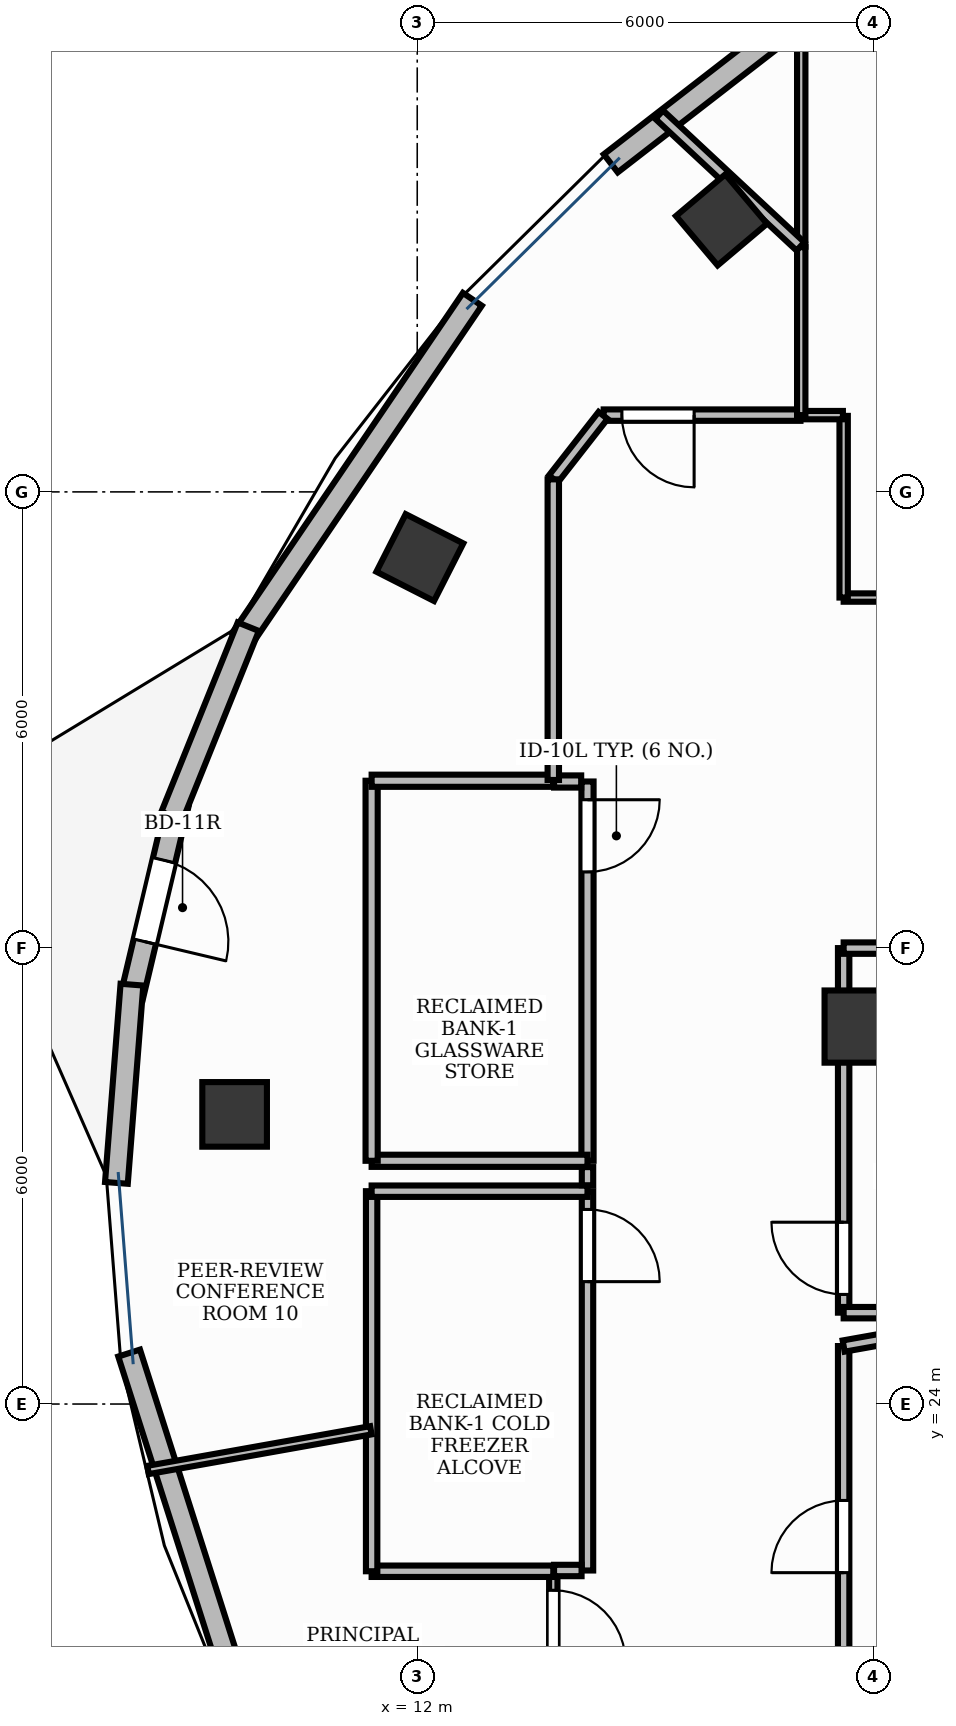
"""IFC4 building model, lengths in metres.
Left out: names, types, materials, properties, quantities, classifications, styles, units other than length and angle.
Written with IfcOpenShell. Run it as: python <this file> out.ifc"""

import sys

from ifc_helpers import new_model, si_unit, direction, frame, frame_2d, origin, origin_2d, place, context, subcontext, project, spatial, rectangle, extrude, element, fill, save


model = new_model("IFC4")
c1 = context("Model", 3, precision=1e-05, world=origin(), true_north=direction((0.0, 1.0)))
c2 = subcontext(c1, "Body", "Model", "MODEL_VIEW")
j1 = project(units=[si_unit("LENGTHUNIT", "METRE"), si_unit("PLANEANGLEUNIT", "RADIAN")], contexts=[c1])
p1 = place(None, origin())
s1 = spatial("IfcSite", under=j1, at=p1, CompositionType="ELEMENT")
p2 = place(p1, origin())
s2 = spatial("IfcBuilding", under=s1, at=p2, CompositionType="ELEMENT")
p3 = place(p2, frame((0.0, 0.0, 264.6)))
s3 = spatial("IfcBuildingStorey", under=s2, at=p3, CompositionType="ELEMENT", Elevation=264.6)
for number, where, z_axis, x_axis in (
    (1, (16.003, 39.579, -0.0), (0.0, 0.0, 1.0), (0.764, 0.645, 0.0)),
    (2, (12.034, 35.136, -0.0), (0.0, 0.0, 1.0), (0.453, 0.891, 0.0)),
    (3, (9.597, 27.81, -0.0), (0.0, 0.0, 1.0), (0.0, 1.0, 0.0)),
):
    element("IfcColumn", number, at=place(p3, frame(where, z_axis=z_axis, x_axis=x_axis)), inside=s3, PredefinedType="COLUMN", context=c2, shape_type="SweptSolid", body=[
        extrude(rectangle(XDim=0.85, YDim=0.85, at=origin_2d()), origin(), (0.0, 0.0, 1.0), 3.901),
    ])
p4 = place(p3, frame((17.834, 28.966, -0.0), z_axis=(0.0, 0.0, 1.0), x_axis=(1.0, 0.0, 0.0)))
e4 = element("IfcColumn", 4, at=p4, inside=s3, PredefinedType="COLUMN", context=c2, shape_type="SweptSolid", body=[
    extrude(rectangle(XDim=0.95, YDim=0.95, at=origin_2d()), origin(), (0.0, 0.0, 1.0), 3.901),
])
p5 = place(p3, frame((8.843, 31.883, 0.0), z_axis=(0.0, 0.0, 1.0), x_axis=(-0.230698003521, -0.973025401093, 0.0)))
e5 = element("IfcWall", 5, at=p5, inside=s3, PredefinedType="STANDARD", context=c2, shape_type="SweptSolid", body=[
    extrude(rectangle(XDim=2.6, YDim=0.3, at=frame_2d((1.3, 0.0))), origin(), (0.0, 0.0, 1.0), 3.9),
])
p6 = place(p5, frame((0.75, 0.0, 0.0)))
e6 = element("IfcOpeningElement", 6, at=p6, cuts=e5, PredefinedType="OPENING", context=c2, shape_type="SweptSolid", body=[
    extrude(rectangle(XDim=1.1, YDim=2.15, at=frame_2d((0.55, 1.075))), frame((0.0, 0.165, 0.0), z_axis=(0.0, -1.0, 0.0), x_axis=(1.0, 0.0, 0.0)), (0.0, 0.0, 1.0), 0.33),
])
p7 = place(p3, frame((16.92, 42.162, 0.0), z_axis=(0.0, 0.0, 1.0), x_axis=(-0.790506568463, -0.612453561682, 0.0)))
e7 = element("IfcWall", 7, at=p7, inside=s3, PredefinedType="STANDARD", context=c2, shape_type="SweptSolid", body=[
    extrude(rectangle(XDim=3.003, YDim=0.3, at=frame_2d((1.501, 0.0))), origin(), (0.0, 0.0, 1.0), 3.9),
])
p8 = place(p3, frame((12.725, 38.534, 0.0), z_axis=(0.0, 0.0, 1.0), x_axis=(-0.561547791281, -0.827444305139, 0.0)))
e8 = element("IfcWall", 8, at=p8, inside=s3, PredefinedType="STANDARD", context=c2, shape_type="SweptSolid", body=[
    extrude(rectangle(XDim=5.407, YDim=0.3, at=frame_2d((2.704, 0.0))), origin(), (0.0, 0.0, 1.0), 3.47),
])
p9 = place(p3, frame((9.778, 34.227, 0.0), z_axis=(0.0, 0.0, 1.0), x_axis=(-0.373974639596, -0.927438930032, 0.0)))
e9 = element("IfcWall", 9, at=p9, inside=s3, PredefinedType="STANDARD", context=c2, shape_type="SweptSolid", body=[
    extrude(rectangle(XDim=2.686, YDim=0.3, at=frame_2d((1.343, 0.0))), origin(), (0.0, 0.0, 1.0), 3.9),
])
p10 = place(p3, frame((8.247, 29.517, 0.0), z_axis=(0.0, 0.0, 1.0), x_axis=(-0.078109406708, -0.996944793147, 0.0)))
e10 = element("IfcWall", 10, at=p10, inside=s3, PredefinedType="STANDARD", context=c2, shape_type="SweptSolid", body=[
    extrude(rectangle(XDim=2.616, YDim=0.3, at=frame_2d((1.308, 0.0))), origin(), (0.0, 0.0, 1.0), 3.9),
])
p11 = place(p3, frame((8.21, 24.67, 0.0), z_axis=(0.0, 0.0, 1.0), x_axis=(0.303876387353, -0.952711467974, 0.0)))
e11 = element("IfcWall", 11, at=p11, inside=s3, PredefinedType="STANDARD", context=c2, shape_type="SweptSolid", body=[
    extrude(rectangle(XDim=5.152, YDim=0.3, at=frame_2d((2.576, 0.0))), origin(), (0.0, 0.0, 1.0), 3.9),
])
p12 = place(p3, frame((14.24, 26.8, 0.0), z_axis=(0.0, 0.0, 1.0), x_axis=(0.0, -1.0, 0.0)))
e12 = element("IfcWall", 12, at=p12, inside=s3, PredefinedType="PARTITIONING", context=c2, shape_type="SweptSolid", body=[
    extrude(rectangle(XDim=4.99, YDim=0.15, at=frame_2d((2.495, 0.0))), origin(), (0.0, 0.0, 1.0), 2.91),
])
p13 = place(p12, frame((0.24, 0.0, 0.0)))
e13 = element("IfcOpeningElement", 13, at=p13, cuts=e12, PredefinedType="OPENING", context=c2, shape_type="SweptSolid", body=[
    extrude(rectangle(XDim=0.95, YDim=2.15, at=frame_2d((0.475, 1.075))), frame((0.0, 0.09, 0.0), z_axis=(0.0, -1.0, 0.0), x_axis=(1.0, 0.0, 0.0)), (0.0, 0.0, 1.0), 0.18),
])
p14 = place(p3, frame((14.24, 32.19, 0.0), z_axis=(0.0, 0.0, 1.0), x_axis=(0.0, -1.0, 0.0)))
e14 = element("IfcWall", 14, at=p14, inside=s3, PredefinedType="PARTITIONING", context=c2, shape_type="SweptSolid", body=[
    extrude(rectangle(XDim=4.99, YDim=0.16, at=frame_2d((2.495, 0.0))), origin(), (0.0, 0.0, 1.0), 2.91),
])
p15 = place(p14, frame((0.24, 0.0, 0.0)))
e15 = element("IfcOpeningElement", 15, at=p15, cuts=e14, PredefinedType="OPENING", context=c2, shape_type="SweptSolid", body=[
    extrude(rectangle(XDim=0.95, YDim=2.15, at=frame_2d((0.475, 1.075))), frame((0.0, 0.095, 0.0), z_axis=(0.0, -1.0, 0.0), x_axis=(1.0, 0.0, 0.0)), (0.0, 0.0, 1.0), 0.19),
])
p16 = place(p3, frame((13.79, 21.79, 0.0), z_axis=(0.0, 0.0, 1.0), x_axis=(0.0, -1.0, 0.0)))
e16 = element("IfcWall", 16, at=p16, inside=s3, PredefinedType="MOVABLE", context=c2, shape_type="SweptSolid", body=[
    extrude(rectangle(XDim=3.955, YDim=0.11, at=frame_2d((1.978, 0.0))), origin(), (0.0, 0.0, 1.0), 2.91),
])
p17 = place(p16, frame((0.24, 0.0, 0.0)))
e17 = element("IfcOpeningElement", 17, at=p17, cuts=e16, PredefinedType="OPENING", context=c2, shape_type="SweptSolid", body=[
    extrude(rectangle(XDim=0.95, YDim=2.15, at=frame_2d((0.475, 1.075))), frame((0.0, 0.07, 0.0), z_axis=(0.0, -1.0, 0.0), x_axis=(1.0, 0.0, 0.0)), (0.0, 0.0, 1.0), 0.14),
])
p18 = place(p3, frame((17.61, 16.41, 0.0), z_axis=(0.0, 0.0, 1.0), x_axis=(0.0, 1.0, 0.0)))
e18 = element("IfcWall", 18, at=p18, inside=s3, PredefinedType="PARTITIONING", context=c2, shape_type="SweptSolid", body=[
    extrude(rectangle(XDim=8.353, YDim=0.15, at=frame_2d((4.176, 0.0))), origin(), (0.0, 0.0, 1.0), 2.91),
])
p19 = place(p18, frame((5.371, 0.0, 0.0)))
e19 = element("IfcOpeningElement", 19, at=p19, cuts=e18, PredefinedType="OPENING", context=c2, shape_type="SweptSolid", body=[
    extrude(rectangle(XDim=0.95, YDim=2.15, at=frame_2d((0.475, 1.075))), frame((0.0, 0.09, 0.0), z_axis=(0.0, -1.0, 0.0), x_axis=(1.0, 0.0, 0.0)), (0.0, 0.0, 1.0), 0.18),
])
p20 = place(p3, frame((17.042, 37.01, 0.0), z_axis=(0.0, 0.0, 1.0), x_axis=(-1.0, 0.0, 0.0)))
e20 = element("IfcWall", 20, at=p20, inside=s3, PredefinedType="PARTITIONING", context=c2, shape_type="SweptSolid", body=[
    extrude(rectangle(XDim=2.589, YDim=0.15, at=frame_2d((1.295, 0.0))), origin(), (0.0, 0.0, 1.0), 2.91),
])
p21 = place(p20, frame((1.399, 0.0, 0.0)))
e21 = element("IfcOpeningElement", 21, at=p21, cuts=e20, PredefinedType="OPENING", context=c2, shape_type="SweptSolid", body=[
    extrude(rectangle(XDim=0.95, YDim=2.15, at=frame_2d((0.475, 1.075))), frame((0.0, 0.09, 0.0), z_axis=(0.0, -1.0, 0.0), x_axis=(1.0, 0.0, 0.0)), (0.0, 0.0, 1.0), 0.18),
])
p22 = place(p3, frame((17.61, 25.202, 0.0), z_axis=(0.0, 0.0, 1.0), x_axis=(0.0, 1.0, 0.0)))
e22 = element("IfcWall", 22, at=p22, inside=s3, PredefinedType="PARTITIONING", context=c2, shape_type="SweptSolid", body=[
    extrude(rectangle(XDim=4.796, YDim=0.15, at=frame_2d((2.398, 0.0))), origin(), (0.0, 0.0, 1.0), 2.91),
])
p23 = place(p22, frame((0.24, 0.0, 0.0)))
e23 = element("IfcOpeningElement", 23, at=p23, cuts=e22, PredefinedType="OPENING", context=c2, shape_type="SweptSolid", body=[
    extrude(rectangle(XDim=0.95, YDim=2.15, at=frame_2d((0.475, 1.075))), frame((0.0, 0.09, 0.0), z_axis=(0.0, -1.0, 0.0), x_axis=(1.0, 0.0, 0.0)), (0.0, 0.0, 1.0), 0.18),
])
p24 = place(p3, frame((14.162, 21.81, 0.0), z_axis=(0.0, 0.0, 1.0), x_axis=(-1.0, 0.0, 0.0)))
e24 = element("IfcWall", 24, at=p24, inside=s3, PredefinedType="PARTITIONING", context=c2, shape_type="SweptSolid", body=[
    extrude(rectangle(XDim=0.362, YDim=0.15, at=frame_2d((0.181, 0.0))), origin(), (0.0, 0.0, 1.0), 2.91),
])
p25 = place(p3, frame((13.79, 21.8, 0.0), z_axis=(0.0, 0.0, 1.0), x_axis=(-1.0, 0.0, 0.0)))
e25 = element("IfcWall", 25, at=p25, inside=s3, PredefinedType="PARTITIONING", context=c2, shape_type="SweptSolid", body=[
    extrude(rectangle(XDim=2.39, YDim=0.15, at=frame_2d((1.195, 0.0))), origin(), (0.0, 0.0, 1.0), 2.91),
])
p26 = place(p3, frame((11.4, 21.8, 0.0), z_axis=(0.0, 0.0, 1.0), x_axis=(0.0, 1.0, 0.0)))
e26 = element("IfcWall", 26, at=p26, inside=s3, PredefinedType="PARTITIONING", context=c2, shape_type="SweptSolid", body=[
    extrude(rectangle(XDim=5.0, YDim=0.15, at=frame_2d((2.5, 0.0))), origin(), (0.0, 0.0, 1.0), 2.91),
])
p27 = place(p3, frame((11.4, 26.8, 0.0), z_axis=(0.0, 0.0, 1.0), x_axis=(1.0, 0.0, 0.0)))
e27 = element("IfcWall", 27, at=p27, inside=s3, PredefinedType="PARTITIONING", context=c2, shape_type="SweptSolid", body=[
    extrude(rectangle(XDim=2.84, YDim=0.15, at=frame_2d((1.42, 0.0))), origin(), (0.0, 0.0, 1.0), 2.91),
])
p28 = place(p3, frame((13.8, 32.19, 0.0), z_axis=(0.0, 0.0, 1.0), x_axis=(1.0, 0.0, 0.0)))
e28 = element("IfcWall", 28, at=p28, inside=s3, PredefinedType="PARTITIONING", context=c2, shape_type="SweptSolid", body=[
    extrude(rectangle(XDim=0.357, YDim=0.16, at=frame_2d((0.178, 0.0))), origin(), (0.0, 0.0, 1.0), 2.91),
])
p29 = place(p3, frame((14.24, 27.2, 0.0), z_axis=(0.0, 0.0, 1.0), x_axis=(-1.0, 0.0, 0.0)))
e29 = element("IfcWall", 29, at=p29, inside=s3, PredefinedType="PARTITIONING", context=c2, shape_type="SweptSolid", body=[
    extrude(rectangle(XDim=2.84, YDim=0.16, at=frame_2d((1.42, 0.0))), origin(), (0.0, 0.0, 1.0), 2.91),
])
p30 = place(p3, frame((11.4, 27.2, 0.0), z_axis=(0.0, 0.0, 1.0), x_axis=(0.0, 1.0, 0.0)))
e30 = element("IfcWall", 30, at=p30, inside=s3, PredefinedType="PARTITIONING", context=c2, shape_type="SweptSolid", body=[
    extrude(rectangle(XDim=5.0, YDim=0.16, at=frame_2d((2.5, 0.0))), origin(), (0.0, 0.0, 1.0), 2.91),
])
p31 = place(p3, frame((11.4, 32.2, 0.0), z_axis=(0.0, 0.0, 1.0), x_axis=(1.0, 0.0, 0.0)))
e31 = element("IfcWall", 31, at=p31, inside=s3, PredefinedType="PARTITIONING", context=c2, shape_type="SweptSolid", body=[
    extrude(rectangle(XDim=2.39, YDim=0.16, at=frame_2d((1.195, 0.0))), origin(), (0.0, 0.0, 1.0), 2.91),
])
p32 = place(p3, frame((8.458, 23.132, 0.0), z_axis=(0.0, 0.0, 1.0), x_axis=(0.984502480413, 0.175370653365, 0.0)))
e32 = element("IfcWall", 32, at=p32, inside=s3, PredefinedType="MOVABLE", context=c2, shape_type="SweptSolid", body=[
    extrude(rectangle(XDim=2.978, YDim=0.11, at=frame_2d((1.489, 0.0))), origin(), (0.0, 0.0, 1.0), 2.91),
])
p33 = place(p3, frame((17.61, 24.763, 0.0), z_axis=(0.0, 0.0, 1.0), x_axis=(0.984503916892, 0.175362589008, 0.0)))
e33 = element("IfcWall", 33, at=p33, inside=s3, PredefinedType="PARTITIONING", context=c2, shape_type="SweptSolid", body=[
    extrude(rectangle(XDim=1.757, YDim=0.15, at=frame_2d((0.878, 0.0))), origin(), (0.0, 0.0, 1.0), 2.91),
])
p34 = place(p3, frame((17.052, 39.226, 0.0), z_axis=(0.0, 0.0, 1.0), x_axis=(0.0, 1.0, 0.0)))
e34 = element("IfcWall", 34, at=p34, inside=s3, PredefinedType="MOVABLE", context=c2, shape_type="SweptSolid", body=[
    extrude(rectangle(XDim=3.099, YDim=0.11, at=frame_2d((1.549, 0.0))), origin(), (0.0, 0.0, 1.0), 2.91),
])
p35 = place(p3, frame((21.79, 34.61, 0.0), z_axis=(0.0, 0.0, 1.0), x_axis=(-1.0, 0.0, 0.0)))
e35 = element("IfcWall", 35, at=p35, inside=s3, PredefinedType="MOVABLE", context=c2, shape_type="SweptSolid", body=[
    extrude(rectangle(XDim=4.18, YDim=0.11, at=frame_2d((2.09, 0.0))), origin(), (0.0, 0.0, 1.0), 2.91),
])
p36 = place(p3, frame((17.61, 34.61, 0.0), z_axis=(0.0, 0.0, 1.0), x_axis=(0.0, 1.0, 0.0)))
e36 = element("IfcWall", 36, at=p36, inside=s3, PredefinedType="MOVABLE", context=c2, shape_type="SweptSolid", body=[
    extrude(rectangle(XDim=2.39, YDim=0.11, at=frame_2d((1.195, 0.0))), origin(), (0.0, 0.0, 1.0), 2.91),
])
p37 = place(p3, frame((17.6, 37.01, 0.0), z_axis=(0.0, 0.0, 1.0), x_axis=(-1.0, 0.0, 0.0)))
e37 = element("IfcWall", 37, at=p37, inside=s3, PredefinedType="MOVABLE", context=c2, shape_type="SweptSolid", body=[
    extrude(rectangle(XDim=0.548, YDim=0.11, at=frame_2d((0.274, 0.0))), origin(), (0.0, 0.0, 1.0), 2.91),
])
p38 = place(p3, frame((17.052, 37.01, 0.0), z_axis=(0.0, 0.0, 1.0), x_axis=(0.0, 1.0, 0.0)))
e38 = element("IfcWall", 38, at=p38, inside=s3, PredefinedType="MOVABLE", context=c2, shape_type="SweptSolid", body=[
    extrude(rectangle(XDim=2.21, YDim=0.11, at=frame_2d((1.105, 0.0))), origin(), (0.0, 0.0, 1.0), 2.91),
])
p39 = place(p3, frame((15.183, 40.963, 0.0), z_axis=(0.0, 0.0, 1.0), x_axis=(0.731313930883, -0.682041006462, 0.0)))
e39 = element("IfcWall", 39, at=p39, inside=s3, PredefinedType="PARTITIONING", context=c2, shape_type="SweptSolid", body=[
    extrude(rectangle(XDim=2.542, YDim=0.15, at=frame_2d((1.271, 0.0))), origin(), (0.0, 0.0, 1.0), 2.91),
])
p40 = place(p3, frame((14.445, 37.006, 0.0), z_axis=(0.0, 0.0, 1.0), x_axis=(-0.615836200745, -0.787874211948, 0.0)))
e40 = element("IfcWall", 40, at=p40, inside=s3, PredefinedType="PARTITIONING", context=c2, shape_type="SweptSolid", body=[
    extrude(rectangle(XDim=1.06, YDim=0.15, at=frame_2d((0.53, 0.0))), origin(), (0.0, 0.0, 1.0), 2.91),
])
p41 = place(p3, frame((13.79, 36.165, 0.0), z_axis=(0.0, 0.0, 1.0), x_axis=(0.0, -1.0, 0.0)))
e41 = element("IfcWall", 41, at=p41, inside=s3, PredefinedType="PARTITIONING", context=c2, shape_type="SweptSolid", body=[
    extrude(rectangle(XDim=3.955, YDim=0.15, at=frame_2d((1.978, 0.0))), origin(), (0.0, 0.0, 1.0), 2.91),
])
p42 = place(p3, frame((14.24, 27.117, 0.0), z_axis=(0.0, 0.0, 1.0), x_axis=(0.0, -1.0, 0.0)))
e42 = element("IfcWall", 42, at=p42, inside=s3, PredefinedType="PARTITIONING", context=c2, shape_type="SweptSolid", body=[
    extrude(rectangle(XDim=0.239, YDim=0.15, at=frame_2d((0.12, 0.0))), origin(), (0.0, 0.0, 1.0), 2.91),
])
p43 = place(p3, frame((18.708, 25.202, 0.0), z_axis=(0.0, 0.0, 1.0), x_axis=(-1.0, 0.0, 0.0)))
e43 = element("IfcWall", 43, at=p43, inside=s3, PredefinedType="PARTITIONING", context=c2, shape_type="SweptSolid", body=[
    extrude(rectangle(XDim=1.098, YDim=0.15, at=frame_2d((0.549, 0.0))), origin(), (0.0, 0.0, 1.0), 2.91),
])
p44 = place(p3, frame((17.61, 29.998, 0.0), z_axis=(0.0, 0.0, 1.0), x_axis=(1.0, 0.0, 0.0)))
e44 = element("IfcWall", 44, at=p44, inside=s3, PredefinedType="PARTITIONING", context=c2, shape_type="SweptSolid", body=[
    extrude(rectangle(XDim=1.73, YDim=0.15, at=frame_2d((0.865, 0.0))), origin(), (0.0, 0.0, 1.0), 2.91),
])
p45 = place(p6, origin())
e45 = element("IfcDoor", 45, at=p45, inside=s3, OperationType="SINGLE_SWING_RIGHT", PredefinedType="DOOR", context=c2, shape_type="SweptSolid", body=[
    extrude(rectangle(XDim=1.1, YDim=2.15, at=frame_2d((0.55, 1.075))), frame((0.0, 0.025, 0.0), z_axis=(0.0, -1.0, 0.0), x_axis=(1.0, 0.0, 0.0)), (0.0, 0.0, 1.0), 0.05),
])
fill(e6, e45)
p46 = place(p13, origin())
e46 = element("IfcDoor", 46, at=p46, inside=s3, OperationType="SINGLE_SWING_RIGHT", PredefinedType="DOOR", context=c2, shape_type="SweptSolid", body=[
    extrude(rectangle(XDim=0.95, YDim=2.15, at=frame_2d((0.475, 1.075))), frame((0.0, 0.025, 0.0), z_axis=(0.0, -1.0, 0.0), x_axis=(1.0, 0.0, 0.0)), (0.0, 0.0, 1.0), 0.05),
])
fill(e13, e46)
p47 = place(p15, origin())
e47 = element("IfcDoor", 47, at=p47, inside=s3, OperationType="SINGLE_SWING_LEFT", PredefinedType="DOOR", context=c2, shape_type="SweptSolid", body=[
    extrude(rectangle(XDim=0.95, YDim=2.15, at=frame_2d((0.475, 1.075))), frame((0.0, 0.025, 0.0), z_axis=(0.0, -1.0, 0.0), x_axis=(1.0, 0.0, 0.0)), (0.0, 0.0, 1.0), 0.05),
])
fill(e15, e47)
p48 = place(p17, origin())
e48 = element("IfcDoor", 48, at=p48, inside=s3, OperationType="SINGLE_SWING_RIGHT", PredefinedType="DOOR", context=c2, shape_type="SweptSolid", body=[
    extrude(rectangle(XDim=0.95, YDim=2.15, at=frame_2d((0.475, 1.075))), frame((0.0, 0.025, 0.0), z_axis=(0.0, -1.0, 0.0), x_axis=(1.0, 0.0, 0.0)), (0.0, 0.0, 1.0), 0.05),
])
fill(e17, e48)
p49 = place(p19, origin())
e49 = element("IfcDoor", 49, at=p49, inside=s3, OperationType="SINGLE_SWING_LEFT", PredefinedType="DOOR", context=c2, shape_type="SweptSolid", body=[
    extrude(rectangle(XDim=0.95, YDim=2.15, at=frame_2d((0.475, 1.075))), frame((0.0, 0.025, 0.0), z_axis=(0.0, -1.0, 0.0), x_axis=(1.0, 0.0, 0.0)), (0.0, 0.0, 1.0), 0.05),
])
fill(e19, e49)
p50 = place(p21, origin())
e50 = element("IfcDoor", 50, at=p50, inside=s3, OperationType="SINGLE_SWING_LEFT", PredefinedType="DOOR", context=c2, shape_type="SweptSolid", body=[
    extrude(rectangle(XDim=0.95, YDim=2.15, at=frame_2d((0.475, 1.075))), frame((0.0, 0.025, 0.0), z_axis=(0.0, -1.0, 0.0), x_axis=(1.0, 0.0, 0.0)), (0.0, 0.0, 1.0), 0.05),
])
fill(e21, e50)
p51 = place(p23, origin())
e51 = element("IfcDoor", 51, at=p51, inside=s3, OperationType="SINGLE_SWING_RIGHT", PredefinedType="DOOR", context=c2, shape_type="SweptSolid", body=[
    extrude(rectangle(XDim=0.95, YDim=2.15, at=frame_2d((0.475, 1.075))), frame((0.0, 0.025, 0.0), z_axis=(0.0, -1.0, 0.0), x_axis=(1.0, 0.0, 0.0)), (0.0, 0.0, 1.0), 0.05),
])
fill(e23, e51)
save(model, sys.argv[1])
